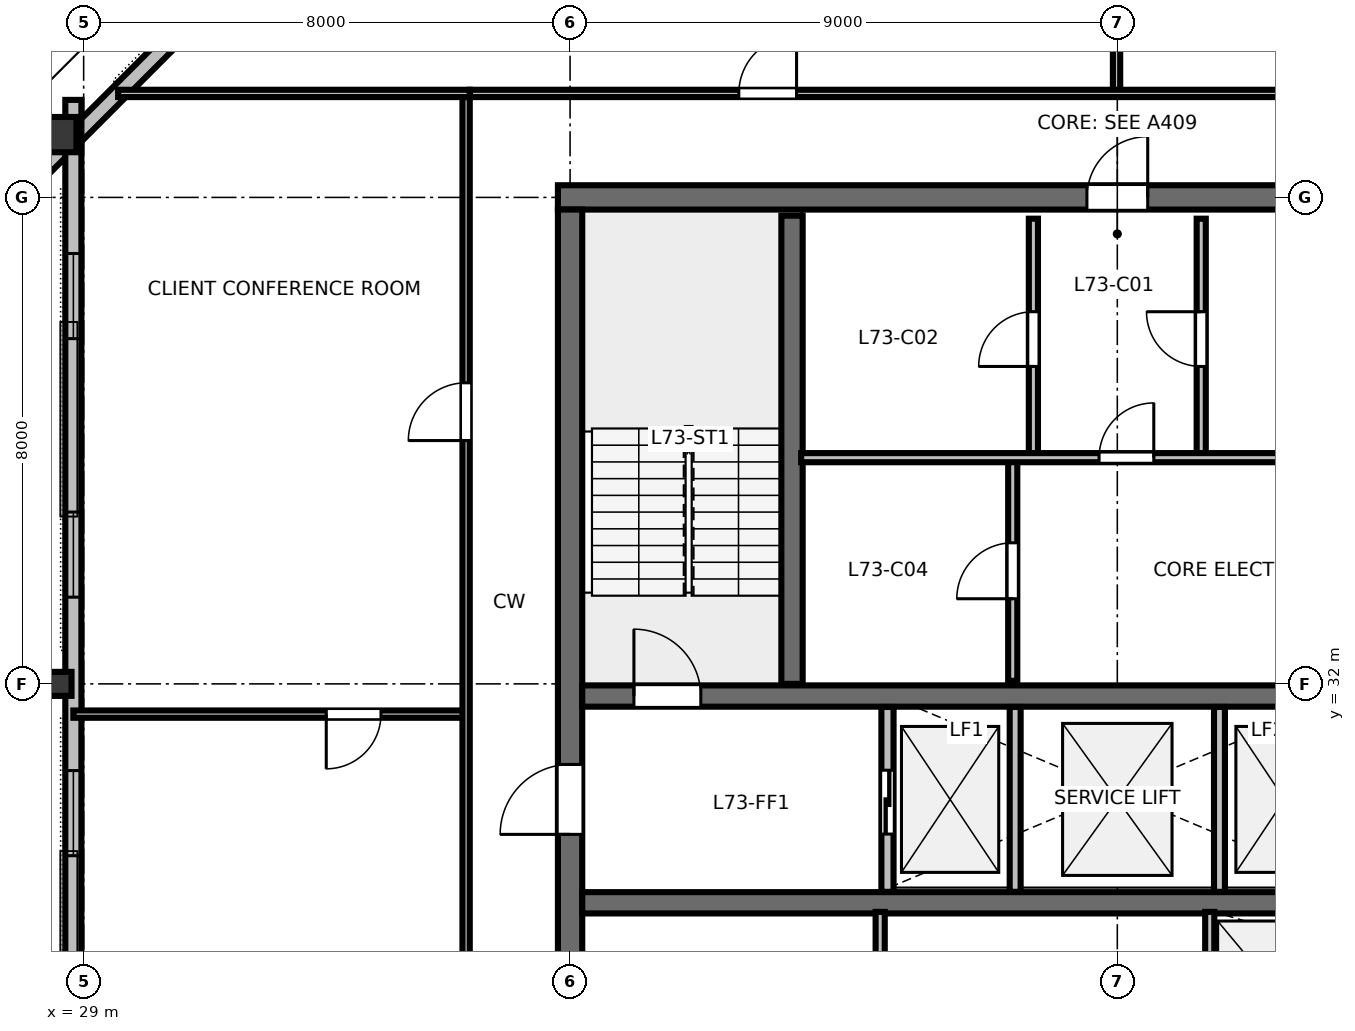
"""IFC4 building model, lengths in metres.
Left out: names, types, materials, properties, quantities, classifications, styles, units other than length and angle.
Written with IfcOpenShell. Run it as: python <this file> out.ifc"""

import sys

from ifc_helpers import new_model, si_unit, direction, frame, frame_2d, origin, origin_2d, place, context, subcontext, project, spatial, rectangle, hollow_rectangle, i_section, extrude, element, fill, save


model = new_model("IFC4")
c1 = context("Model", 3, precision=1e-05, world=origin(), true_north=direction((0.0, 1.0)))
c2 = subcontext(c1, "Body", "Model", "MODEL_VIEW")
j1 = project(units=[si_unit("LENGTHUNIT", "METRE"), si_unit("PLANEANGLEUNIT", "RADIAN")], contexts=[c1])
p1 = place(None, origin())
s1 = spatial("IfcSite", under=j1, at=p1, CompositionType="ELEMENT")
p2 = place(p1, origin())
s2 = spatial("IfcBuilding", under=s1, at=p2, CompositionType="ELEMENT")
p3 = place(p2, frame((0.0, 0.0, 275.4)))
s3 = spatial("IfcBuildingStorey", under=s2, at=p3, CompositionType="ELEMENT", Elevation=275.4)
p4 = place(p3, frame((36.8, 40.0, 0.0), z_axis=(0.0, 0.0, 1.0), x_axis=(1.0, 0.0, 0.0)))
e1 = element("IfcWall", 1, at=p4, inside=s3, PredefinedType="SHEAR", context=c2, shape_type="SweptSolid", body=[
    extrude(rectangle(XDim=18.4, YDim=0.4, at=frame_2d((9.2, 0.0))), origin(), (0.0, 0.0, 1.0), 3.28),
])
p5 = place(p4, frame((8.7, 0.0, 0.0)))
e2 = element("IfcOpeningElement", 2, at=p5, cuts=e1, PredefinedType="OPENING", context=c2, shape_type="SweptSolid", body=[
    extrude(rectangle(XDim=1.0, YDim=2.15, at=frame_2d((0.5, 1.075))), frame((0.0, 0.21, 0.0), z_axis=(0.0, -1.0, 0.0), x_axis=(1.0, 0.0, 0.0)), (0.0, 0.0, 1.0), 0.42),
])
p6 = place(p3, frame((37.0, 24.2, 0.0), z_axis=(0.0, 0.0, 1.0), x_axis=(0.0, 1.0, 0.0)))
e3 = element("IfcWall", 3, at=p6, inside=s3, PredefinedType="SHEAR", context=c2, shape_type="SweptSolid", body=[
    extrude(rectangle(XDim=15.6, YDim=0.4, at=frame_2d((7.8, 0.0))), origin(), (0.0, 0.0, 1.0), 3.28),
])
p7 = place(p6, frame((5.325, 0.0, 0.0)))
e4 = element("IfcOpeningElement", 4, at=p7, cuts=e3, PredefinedType="OPENING", context=c2, shape_type="SweptSolid", body=[
    extrude(rectangle(XDim=1.15, YDim=2.15, at=frame_2d((0.575, 1.075))), frame((0.0, 0.21, 0.0), z_axis=(0.0, -1.0, 0.0), x_axis=(1.0, 0.0, 0.0)), (0.0, 0.0, 1.0), 0.42),
])
p8 = place(p3, frame((37.2, 31.8, 0.0), z_axis=(0.0, 0.0, 1.0), x_axis=(1.0, 0.0, 0.0)))
e5 = element("IfcWall", 5, at=p8, inside=s3, PredefinedType="SHEAR", context=c2, shape_type="SweptSolid", body=[
    extrude(rectangle(XDim=17.6, YDim=0.35, at=frame_2d((8.8, 0.0))), origin(), (0.0, 0.0, 1.0), 3.28),
])
p9 = place(p8, frame((0.85, 0.0, 0.0)))
e6 = element("IfcOpeningElement", 6, at=p9, cuts=e5, PredefinedType="OPENING", context=c2, shape_type="SweptSolid", body=[
    extrude(rectangle(XDim=1.1, YDim=2.15, at=frame_2d((0.55, 1.075))), frame((0.0, 0.185, 0.0), z_axis=(0.0, -1.0, 0.0), x_axis=(1.0, 0.0, 0.0)), (0.0, 0.0, 1.0), 0.37),
])
p10 = place(p8, frame((14.75, 0.0, 0.0)))
e7 = element("IfcOpeningElement", 7, at=p10, cuts=e5, PredefinedType="OPENING", context=c2, shape_type="SweptSolid", body=[
    extrude(rectangle(XDim=1.1, YDim=2.15, at=frame_2d((0.55, 1.075))), frame((0.0, 0.185, 0.0), z_axis=(0.0, -1.0, 0.0), x_axis=(1.0, 0.0, 0.0)), (0.0, 0.0, 1.0), 0.37),
])
p11 = place(p3, frame((37.2, 28.4, 0.0), z_axis=(0.0, 0.0, 1.0), x_axis=(1.0, 0.0, 0.0)))
e8 = element("IfcWall", 8, at=p11, inside=s3, PredefinedType="SHEAR", context=c2, shape_type="SweptSolid", body=[
    extrude(rectangle(XDim=17.6, YDim=0.35, at=frame_2d((8.8, 0.0))), origin(), (0.0, 0.0, 1.0), 3.28),
])
p12 = place(p3, frame((28.531, 41.033, 0.0), z_axis=(0.124526454344, -0.108785128068, 0.986234737818), x_axis=(-0.742735851575, 0.648846987251, 0.165351268276)))
e9 = element("IfcColumn", 9, at=p12, inside=s3, PredefinedType="COLUMN", context=c2, shape_type="SweptSolid", body=[
    extrude(hollow_rectangle(XDim=0.58, YDim=0.7, WallThickness=0.032, at=origin_2d()), origin(), (0.0, 0.0, 1.0), 3.303),
])
p13 = place(p3, frame((28.611, 32.0, 0.0), z_axis=(0.124611214962, 0.0, 0.99220564658), x_axis=(-0.99220564658, 0.0, 0.124611214962)))
e10 = element("IfcColumn", 10, at=p13, inside=s3, PredefinedType="COLUMN", context=c2, shape_type="SweptSolid", body=[
    extrude(i_section(OverallWidth=0.395, OverallDepth=0.38, WebThickness=0.019, FlangeThickness=0.03, FilletRadius=0.025, at=origin_2d()), origin(), (0.0, 0.0, 1.0), 3.284),
])
p14 = place(p3, frame((36.253, 48.396, 0.0), z_axis=(0.0, 0.0, 1.0), x_axis=(-0.707106781187, -0.707106781187, 0.0)))
e11 = element("IfcWall", 11, at=p14, inside=s3, PredefinedType="STANDARD", context=c2, shape_type="SweptSolid", body=[
    extrude(rectangle(XDim=11.125, YDim=0.265, at=frame_2d((5.562, 0.0))), origin(), (0.0, 0.0, 1.0), 2.717),
])
p15 = place(p3, frame((28.831, 41.604, 0.0), z_axis=(0.0, 0.0, 1.0), x_axis=(0.0, -1.0, 0.0)))
e12 = element("IfcWall", 12, at=p15, inside=s3, PredefinedType="STANDARD", context=c2, shape_type="SweptSolid", body=[
    extrude(rectangle(XDim=19.207, YDim=0.265, at=frame_2d((9.604, 0.0))), origin(), (0.0, 0.0, 1.0), 2.717),
])
p16 = place(p15, frame((2.526, 0.0, 0.85)))
e13 = element("IfcOpeningElement", 13, at=p16, cuts=e12, PredefinedType="OPENING", context=c2, shape_type="SweptSolid", body=[
    extrude(rectangle(XDim=1.4, YDim=1.2, at=frame_2d((0.7, 0.6))), frame((0.0, 0.142, 0.0), z_axis=(0.0, -1.0, 0.0), x_axis=(1.0, 0.0, 0.0)), (0.0, 0.0, 1.0), 0.285),
])
p17 = place(p15, frame((6.778, 0.0, 0.85)))
e14 = element("IfcOpeningElement", 14, at=p17, cuts=e12, PredefinedType="OPENING", context=c2, shape_type="SweptSolid", body=[
    extrude(rectangle(XDim=1.4, YDim=1.2, at=frame_2d((0.7, 0.6))), frame((0.0, 0.142, 0.0), z_axis=(0.0, -1.0, 0.0), x_axis=(1.0, 0.0, 0.0)), (0.0, 0.0, 1.0), 0.285),
])
p18 = place(p15, frame((11.03, 0.0, 0.85)))
e15 = element("IfcOpeningElement", 15, at=p18, cuts=e12, PredefinedType="OPENING", context=c2, shape_type="SweptSolid", body=[
    extrude(rectangle(XDim=1.4, YDim=1.2, at=frame_2d((0.7, 0.6))), frame((0.0, 0.142, 0.0), z_axis=(0.0, -1.0, 0.0), x_axis=(1.0, 0.0, 0.0)), (0.0, 0.0, 1.0), 0.285),
])
p19 = place(p15, frame((15.281, 0.0, 0.85)))
e16 = element("IfcOpeningElement", 16, at=p19, cuts=e12, PredefinedType="OPENING", context=c2, shape_type="SweptSolid", body=[
    extrude(rectangle(XDim=1.4, YDim=1.2, at=frame_2d((0.7, 0.6))), frame((0.0, 0.142, 0.0), z_axis=(0.0, -1.0, 0.0), x_axis=(1.0, 0.0, 0.0)), (0.0, 0.0, 1.0), 0.285),
])
p20 = place(p3, frame((40.65, 32.0, 0.0), z_axis=(0.0, 0.0, 1.0), x_axis=(0.0, 1.0, 0.0)))
e17 = element("IfcWall", 17, at=p20, inside=s3, PredefinedType="SHEAR", context=c2, shape_type="SweptSolid", body=[
    extrude(rectangle(XDim=7.7, YDim=0.35, at=frame_2d((3.85, 0.0))), origin(), (0.0, 0.0, 1.0), 3.6),
])
p21 = place(p3, frame((44.62, 35.72, 0.0), z_axis=(0.0, 0.0, 1.0), x_axis=(0.0, 1.0, 0.0)))
e18 = element("IfcWall", 18, at=p21, inside=s3, PredefinedType="PARTITIONING", context=c2, shape_type="SweptSolid", body=[
    extrude(rectangle(XDim=3.93, YDim=0.15, at=frame_2d((1.965, 0.0))), origin(), (0.0, 0.0, 1.0), 3.26),
])
p22 = place(p21, frame((1.5, 0.0, 0.0)))
e19 = element("IfcOpeningElement", 19, at=p22, cuts=e18, PredefinedType="OPENING", context=c2, shape_type="SweptSolid", body=[
    extrude(rectangle(XDim=0.9, YDim=2.15, at=frame_2d((0.45, 1.075))), frame((0.0, 0.085, 0.0), z_axis=(0.0, -1.0, 0.0), x_axis=(1.0, 0.0, 0.0)), (0.0, 0.0, 1.0), 0.17),
])
p23 = place(p3, frame((47.38, 35.72, 0.0), z_axis=(0.0, 0.0, 1.0), x_axis=(0.0, 1.0, 0.0)))
e20 = element("IfcWall", 20, at=p23, inside=s3, PredefinedType="PARTITIONING", context=c2, shape_type="SweptSolid", body=[
    extrude(rectangle(XDim=3.93, YDim=0.15, at=frame_2d((1.965, 0.0))), origin(), (0.0, 0.0, 1.0), 3.26),
])
p24 = place(p23, frame((1.5, 0.0, 0.0)))
e21 = element("IfcOpeningElement", 21, at=p24, cuts=e20, PredefinedType="OPENING", context=c2, shape_type="SweptSolid", body=[
    extrude(rectangle(XDim=0.9, YDim=2.15, at=frame_2d((0.45, 1.075))), frame((0.0, 0.085, 0.0), z_axis=(0.0, -1.0, 0.0), x_axis=(1.0, 0.0, 0.0)), (0.0, 0.0, 1.0), 0.17),
])
p25 = place(p3, frame((44.28, 32.05, 0.0), z_axis=(0.0, 0.0, 1.0), x_axis=(0.0, 1.0, 0.0)))
e22 = element("IfcWall", 22, at=p25, inside=s3, PredefinedType="PARTITIONING", context=c2, shape_type="SweptSolid", body=[
    extrude(rectangle(XDim=3.67, YDim=0.15, at=frame_2d((1.835, 0.0))), origin(), (0.0, 0.0, 1.0), 3.26),
])
p26 = place(p25, frame((1.35, 0.0, 0.0)))
e23 = element("IfcOpeningElement", 23, at=p26, cuts=e22, PredefinedType="OPENING", context=c2, shape_type="SweptSolid", body=[
    extrude(rectangle(XDim=0.92, YDim=2.15, at=frame_2d((0.46, 1.075))), frame((0.0, 0.085, 0.0), z_axis=(0.0, -1.0, 0.0), x_axis=(1.0, 0.0, 0.0)), (0.0, 0.0, 1.0), 0.17),
])
p27 = place(p3, frame((40.8, 35.72, 0.0), z_axis=(0.0, 0.0, 1.0), x_axis=(1.0, 0.0, 0.0)))
e24 = element("IfcWall", 24, at=p27, inside=s3, PredefinedType="PARTITIONING", context=c2, shape_type="SweptSolid", body=[
    extrude(rectangle(XDim=10.4, YDim=0.15, at=frame_2d((5.2, 0.0))), origin(), (0.0, 0.0, 1.0), 3.26),
])
p28 = place(p27, frame((4.9, 0.0, 0.0)))
e25 = element("IfcOpeningElement", 25, at=p28, cuts=e24, PredefinedType="OPENING", context=c2, shape_type="SweptSolid", body=[
    extrude(rectangle(XDim=0.9, YDim=2.15, at=frame_2d((0.45, 1.075))), frame((0.0, 0.085, 0.0), z_axis=(0.0, -1.0, 0.0), x_axis=(1.0, 0.0, 0.0)), (0.0, 0.0, 1.0), 0.17),
])
p29 = place(p3, frame((42.22, 28.58, 0.0), z_axis=(0.0, 0.0, 1.0), x_axis=(0.0, 1.0, 0.0)))
e26 = element("IfcWall", 26, at=p29, inside=s3, PredefinedType="PARTITIONING", context=c2, shape_type="SweptSolid", body=[
    extrude(rectangle(XDim=3.04, YDim=0.2, at=frame_2d((1.52, 0.0))), origin(), (0.0, 0.0, 1.0), 3.26),
])
p30 = place(p29, frame((0.95, 0.0, 0.0)))
e27 = element("IfcOpeningElement", 27, at=p30, cuts=e26, PredefinedType="OPENING", context=c2, shape_type="SweptSolid", body=[
    extrude(rectangle(XDim=1.05, YDim=2.15, at=frame_2d((0.525, 1.075))), frame((0.0, 0.11, 0.0), z_axis=(0.0, -1.0, 0.0), x_axis=(1.0, 0.0, 0.0)), (0.0, 0.0, 1.0), 0.22),
])
for number, where, z_axis, x_axis in (
    (28, (44.32, 28.58, 0.0), (0.0, 0.0, 1.0), (0.0, 1.0, 0.0)),
    (29, (47.68, 28.58, 0.0), (0.0, 0.0, 1.0), (0.0, 1.0, 0.0)),
):
    element("IfcWall", number, at=place(p3, frame(where, z_axis=z_axis, x_axis=x_axis)), inside=s3, PredefinedType="PARTITIONING", context=c2, shape_type="SweptSolid", body=[
        extrude(rectangle(XDim=3.04, YDim=0.18, at=frame_2d((1.52, 0.0))), origin(), (0.0, 0.0, 1.0), 3.26),
    ])
p31 = place(p3, frame((42.1, 24.35, 0.0), z_axis=(0.0, 0.0, 1.0), x_axis=(0.0, 1.0, 0.0)))
e30 = element("IfcWall", 30, at=p31, inside=s3, PredefinedType="PARTITIONING", context=c2, shape_type="SweptSolid", body=[
    extrude(rectangle(XDim=3.9, YDim=0.15, at=frame_2d((1.95, 0.0))), origin(), (0.0, 0.0, 1.0), 3.26),
])
p32 = place(p31, frame((1.5, 0.0, 0.0)))
e31 = element("IfcOpeningElement", 31, at=p32, cuts=e30, PredefinedType="OPENING", context=c2, shape_type="SweptSolid", body=[
    extrude(rectangle(XDim=0.9, YDim=2.15, at=frame_2d((0.45, 1.075))), frame((0.0, 0.085, 0.0), z_axis=(0.0, -1.0, 0.0), x_axis=(1.0, 0.0, 0.0)), (0.0, 0.0, 1.0), 0.17),
])
p33 = place(p3, frame((47.52, 24.35, 0.0), z_axis=(0.0, 0.0, 1.0), x_axis=(0.0, 1.0, 0.0)))
e32 = element("IfcWall", 32, at=p33, inside=s3, PredefinedType="PARTITIONING", context=c2, shape_type="SweptSolid", body=[
    extrude(rectangle(XDim=3.9, YDim=0.15, at=frame_2d((1.95, 0.0))), origin(), (0.0, 0.0, 1.0), 3.26),
])
p34 = place(p33, frame((0.35, 0.0, 0.0)))
e33 = element("IfcOpeningElement", 33, at=p34, cuts=e32, PredefinedType="OPENING", context=c2, shape_type="SweptSolid", body=[
    extrude(rectangle(XDim=0.9, YDim=2.15, at=frame_2d((0.45, 1.075))), frame((0.0, 0.085, 0.0), z_axis=(0.0, -1.0, 0.0), x_axis=(1.0, 0.0, 0.0)), (0.0, 0.0, 1.0), 0.17),
])
p35 = place(p3, frame((45.987, 41.71, 0.0), z_axis=(0.0, 0.0, 1.0), x_axis=(0.0, 1.0, 0.0)))
e34 = element("IfcWall", 34, at=p35, inside=s3, PredefinedType="PARTITIONING", context=c2, shape_type="SweptSolid", body=[
    extrude(rectangle(XDim=6.241, YDim=0.12, at=frame_2d((3.121, 0.0))), origin(), (0.0, 0.0, 1.0), 2.54),
])
p36 = place(p35, frame((1.4, 0.0, 0.0)))
e35 = element("IfcOpeningElement", 35, at=p36, cuts=e34, PredefinedType="OPENING", context=c2, shape_type="SweptSolid", body=[
    extrude(rectangle(XDim=0.9, YDim=2.15, at=frame_2d((0.45, 1.075))), frame((0.0, 0.07, 0.0), z_axis=(0.0, -1.0, 0.0), x_axis=(1.0, 0.0, 0.0)), (0.0, 0.0, 1.0), 0.14),
])
p37 = place(p3, frame((35.35, 41.71, 0.0), z_axis=(0.0, 0.0, 1.0), x_axis=(1.0, 0.0, 0.0)))
e36 = element("IfcWall", 36, at=p37, inside=s3, PredefinedType="PARTITIONING", context=c2, shape_type="SweptSolid", body=[
    extrude(rectangle(XDim=21.3, YDim=0.12, at=frame_2d((10.65, 0.0))), origin(), (0.0, 0.0, 1.0), 2.54),
])
p38 = place(p37, frame((4.425, 0.0, 0.0)))
e37 = element("IfcOpeningElement", 37, at=p38, cuts=e36, PredefinedType="OPENING", context=c2, shape_type="SweptSolid", body=[
    extrude(rectangle(XDim=0.95, YDim=2.15, at=frame_2d((0.475, 1.075))), frame((0.0, 0.07, 0.0), z_axis=(0.0, -1.0, 0.0), x_axis=(1.0, 0.0, 0.0)), (0.0, 0.0, 1.0), 0.14),
])
p39 = place(p37, frame((15.925, 0.0, 0.0)))
e38 = element("IfcOpeningElement", 38, at=p39, cuts=e36, PredefinedType="OPENING", context=c2, shape_type="SweptSolid", body=[
    extrude(rectangle(XDim=0.95, YDim=2.15, at=frame_2d((0.475, 1.075))), frame((0.0, 0.07, 0.0), z_axis=(0.0, -1.0, 0.0), x_axis=(1.0, 0.0, 0.0)), (0.0, 0.0, 1.0), 0.14),
])
p40 = place(p3, frame((35.29, 31.503, 0.0), z_axis=(0.0, 0.0, 1.0), x_axis=(-1.0, 0.0, 0.0)))
e39 = element("IfcWall", 39, at=p40, inside=s3, PredefinedType="PARTITIONING", context=c2, shape_type="SweptSolid", body=[
    extrude(rectangle(XDim=6.459, YDim=0.12, at=frame_2d((3.229, 0.0))), origin(), (0.0, 0.0, 1.0), 2.54),
])
p41 = place(p40, frame((1.4, 0.0, 0.0)))
e40 = element("IfcOpeningElement", 40, at=p41, cuts=e39, PredefinedType="OPENING", context=c2, shape_type="SweptSolid", body=[
    extrude(rectangle(XDim=0.9, YDim=2.15, at=frame_2d((0.45, 1.075))), frame((0.0, 0.07, 0.0), z_axis=(0.0, -1.0, 0.0), x_axis=(1.0, 0.0, 0.0)), (0.0, 0.0, 1.0), 0.14),
])
p42 = place(p3, frame((35.29, 22.35, 0.0), z_axis=(0.0, 0.0, 1.0), x_axis=(0.0, 1.0, 0.0)))
e41 = element("IfcWall", 41, at=p42, inside=s3, PredefinedType="PARTITIONING", context=c2, shape_type="SweptSolid", body=[
    extrude(rectangle(XDim=19.3, YDim=0.12, at=frame_2d((9.65, 0.0))), origin(), (0.0, 0.0, 1.0), 2.54),
])
p43 = place(p42, frame((4.201, 0.0, 0.0)))
e42 = element("IfcOpeningElement", 42, at=p43, cuts=e41, PredefinedType="OPENING", context=c2, shape_type="SweptSolid", body=[
    extrude(rectangle(XDim=0.95, YDim=2.15, at=frame_2d((0.475, 1.075))), frame((0.0, 0.07, 0.0), z_axis=(0.0, -1.0, 0.0), x_axis=(1.0, 0.0, 0.0)), (0.0, 0.0, 1.0), 0.14),
])
p44 = place(p42, frame((13.651, 0.0, 0.0)))
e43 = element("IfcOpeningElement", 43, at=p44, cuts=e41, PredefinedType="OPENING", context=c2, shape_type="SweptSolid", body=[
    extrude(rectangle(XDim=0.95, YDim=2.15, at=frame_2d((0.475, 1.075))), frame((0.0, 0.07, 0.0), z_axis=(0.0, -1.0, 0.0), x_axis=(1.0, 0.0, 0.0)), (0.0, 0.0, 1.0), 0.14),
])
p45 = place(p3, frame((35.35, 41.71, 0.0), z_axis=(0.0, 0.0, 1.0), x_axis=(-1.0, 0.0, 0.0)))
e44 = element("IfcWall", 44, at=p45, inside=s3, PredefinedType="PARTITIONING", context=c2, shape_type="SweptSolid", body=[
    extrude(rectangle(XDim=5.783, YDim=0.12, at=frame_2d((2.892, 0.0))), origin(), (0.0, 0.0, 1.0), 2.54),
])
p46 = place(p16, origin())
e45 = element("IfcWindow", 45, at=p46, inside=s3, PartitioningType="SINGLE_PANEL", PredefinedType="WINDOW", context=c2, shape_type="SweptSolid", body=[
    extrude(rectangle(XDim=1.4, YDim=1.2, at=frame_2d((0.7, 0.6))), frame((0.0, 0.03, 0.0), z_axis=(0.0, -1.0, 0.0), x_axis=(1.0, 0.0, 0.0)), (0.0, 0.0, 1.0), 0.06),
])
fill(e13, e45)
p47 = place(p17, origin())
e46 = element("IfcWindow", 46, at=p47, inside=s3, PartitioningType="SINGLE_PANEL", PredefinedType="WINDOW", context=c2, shape_type="SweptSolid", body=[
    extrude(rectangle(XDim=1.4, YDim=1.2, at=frame_2d((0.7, 0.6))), frame((0.0, 0.03, 0.0), z_axis=(0.0, -1.0, 0.0), x_axis=(1.0, 0.0, 0.0)), (0.0, 0.0, 1.0), 0.06),
])
fill(e14, e46)
p48 = place(p18, origin())
e47 = element("IfcWindow", 47, at=p48, inside=s3, PartitioningType="SINGLE_PANEL", PredefinedType="WINDOW", context=c2, shape_type="SweptSolid", body=[
    extrude(rectangle(XDim=1.4, YDim=1.2, at=frame_2d((0.7, 0.6))), frame((0.0, 0.03, 0.0), z_axis=(0.0, -1.0, 0.0), x_axis=(1.0, 0.0, 0.0)), (0.0, 0.0, 1.0), 0.06),
])
fill(e15, e47)
p49 = place(p9, origin())
e48 = element("IfcDoor", 48, at=p49, inside=s3, OperationType="SINGLE_SWING_LEFT", PredefinedType="DOOR", context=c2, shape_type="SweptSolid", body=[
    extrude(rectangle(XDim=1.1, YDim=2.15, at=frame_2d((0.55, 1.075))), frame((0.0, 0.025, 0.0), z_axis=(0.0, -1.0, 0.0), x_axis=(1.0, 0.0, 0.0)), (0.0, 0.0, 1.0), 0.05),
])
fill(e6, e48)
p50 = place(p5, origin())
e49 = element("IfcDoor", 49, at=p50, inside=s3, OperationType="SINGLE_SWING_RIGHT", PredefinedType="DOOR", context=c2, shape_type="SweptSolid", body=[
    extrude(rectangle(XDim=1.0, YDim=2.15, at=frame_2d((0.5, 1.075))), frame((0.0, 0.025, 0.0), z_axis=(0.0, -1.0, 0.0), x_axis=(1.0, 0.0, 0.0)), (0.0, 0.0, 1.0), 0.05),
])
fill(e2, e49)
p51 = place(p7, origin())
e50 = element("IfcDoor", 50, at=p51, inside=s3, OperationType="SINGLE_SWING_LEFT", PredefinedType="DOOR", context=c2, shape_type="SweptSolid", body=[
    extrude(rectangle(XDim=1.15, YDim=2.15, at=frame_2d((0.575, 1.075))), frame((0.0, 0.025, 0.0), z_axis=(0.0, -1.0, 0.0), x_axis=(1.0, 0.0, 0.0)), (0.0, 0.0, 1.0), 0.05),
])
fill(e4, e50)
p52 = place(p22, origin())
e51 = element("IfcDoor", 51, at=p52, inside=s3, OperationType="SINGLE_SWING_LEFT", PredefinedType="DOOR", context=c2, shape_type="SweptSolid", body=[
    extrude(rectangle(XDim=0.9, YDim=2.15, at=frame_2d((0.45, 1.075))), frame((0.0, 0.025, 0.0), z_axis=(0.0, -1.0, 0.0), x_axis=(1.0, 0.0, 0.0)), (0.0, 0.0, 1.0), 0.05),
])
fill(e19, e51)
p53 = place(p24, origin())
e52 = element("IfcDoor", 52, at=p53, inside=s3, OperationType="SINGLE_SWING_RIGHT", PredefinedType="DOOR", context=c2, shape_type="SweptSolid", body=[
    extrude(rectangle(XDim=0.9, YDim=2.15, at=frame_2d((0.45, 1.075))), frame((0.0, 0.025, 0.0), z_axis=(0.0, -1.0, 0.0), x_axis=(1.0, 0.0, 0.0)), (0.0, 0.0, 1.0), 0.05),
])
fill(e21, e52)
p54 = place(p26, origin())
e53 = element("IfcDoor", 53, at=p54, inside=s3, OperationType="SINGLE_SWING_LEFT", PredefinedType="DOOR", context=c2, shape_type="SweptSolid", body=[
    extrude(rectangle(XDim=0.92, YDim=2.15, at=frame_2d((0.46, 1.075))), frame((0.0, 0.025, 0.0), z_axis=(0.0, -1.0, 0.0), x_axis=(1.0, 0.0, 0.0)), (0.0, 0.0, 1.0), 0.05),
])
fill(e23, e53)
p55 = place(p28, origin())
e54 = element("IfcDoor", 54, at=p55, inside=s3, OperationType="SINGLE_SWING_RIGHT", PredefinedType="DOOR", context=c2, shape_type="SweptSolid", body=[
    extrude(rectangle(XDim=0.9, YDim=2.15, at=frame_2d((0.45, 1.075))), frame((0.0, 0.025, 0.0), z_axis=(0.0, -1.0, 0.0), x_axis=(1.0, 0.0, 0.0)), (0.0, 0.0, 1.0), 0.05),
])
fill(e25, e54)
p56 = place(p30, origin())
e55 = element("IfcDoor", 55, at=p56, inside=s3, OperationType="SLIDING_TO_LEFT", PredefinedType="DOOR", context=c2, shape_type="SweptSolid", body=[
    extrude(rectangle(XDim=1.05, YDim=2.15, at=frame_2d((0.525, 1.075))), frame((0.0, 0.025, 0.0), z_axis=(0.0, -1.0, 0.0), x_axis=(1.0, 0.0, 0.0)), (0.0, 0.0, 1.0), 0.05),
])
fill(e27, e55)
p57 = place(p38, origin())
e56 = element("IfcDoor", 56, at=p57, inside=s3, OperationType="SINGLE_SWING_RIGHT", PredefinedType="DOOR", context=c2, shape_type="SweptSolid", body=[
    extrude(rectangle(XDim=0.95, YDim=2.15, at=frame_2d((0.475, 1.075))), frame((0.0, 0.025, 0.0), z_axis=(0.0, -1.0, 0.0), x_axis=(1.0, 0.0, 0.0)), (0.0, 0.0, 1.0), 0.05),
])
fill(e37, e56)
p58 = place(p41, origin())
e57 = element("IfcDoor", 57, at=p58, inside=s3, OperationType="SINGLE_SWING_RIGHT", PredefinedType="DOOR", context=c2, shape_type="SweptSolid", body=[
    extrude(rectangle(XDim=0.9, YDim=2.15, at=frame_2d((0.45, 1.075))), frame((0.0, 0.025, 0.0), z_axis=(0.0, -1.0, 0.0), x_axis=(1.0, 0.0, 0.0)), (0.0, 0.0, 1.0), 0.05),
])
fill(e40, e57)
p59 = place(p44, origin())
e58 = element("IfcDoor", 58, at=p59, inside=s3, OperationType="SINGLE_SWING_LEFT", PredefinedType="DOOR", context=c2, shape_type="SweptSolid", body=[
    extrude(rectangle(XDim=0.95, YDim=2.15, at=frame_2d((0.475, 1.075))), frame((0.0, 0.025, 0.0), z_axis=(0.0, -1.0, 0.0), x_axis=(1.0, 0.0, 0.0)), (0.0, 0.0, 1.0), 0.05),
])
fill(e43, e58)
save(model, sys.argv[1])
